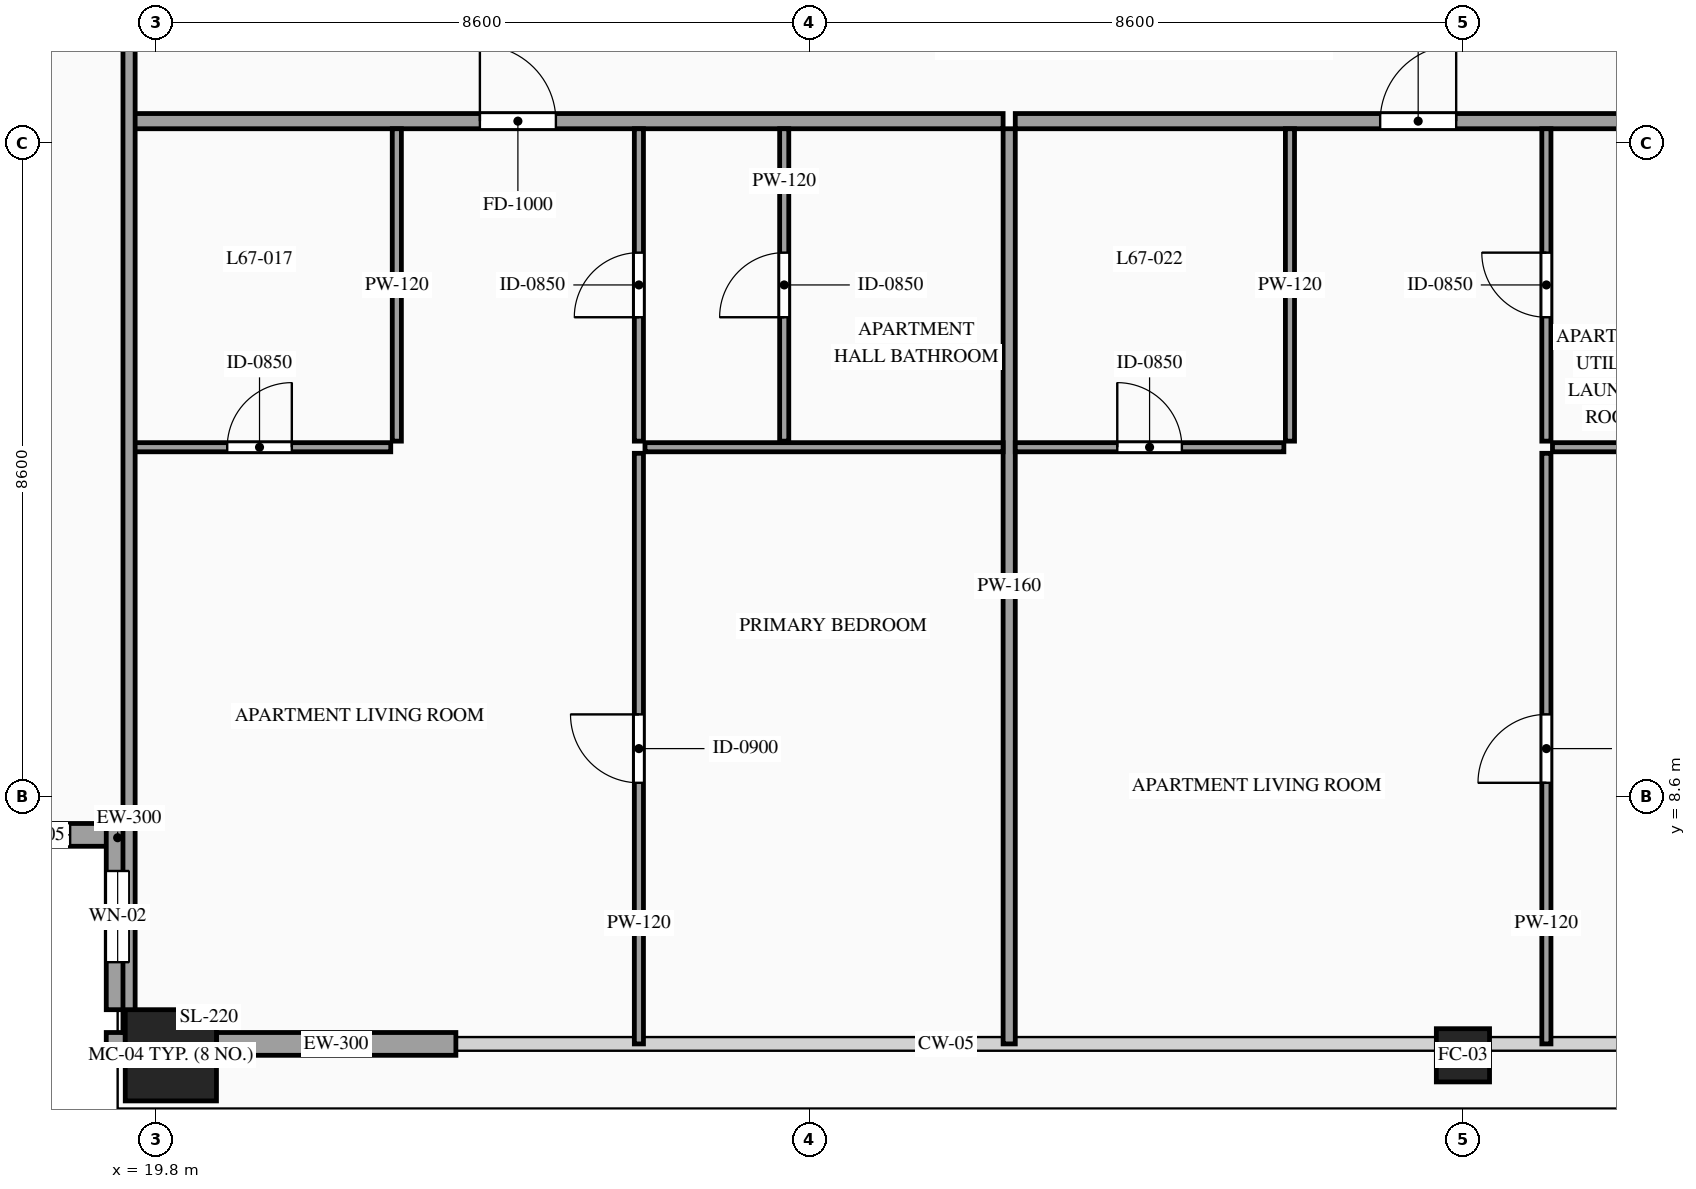
"""IFC4 building model, lengths in metres.
Left out: names, types, materials, properties, quantities, classifications, styles, units other than length and angle.
Written with IfcOpenShell. Run it as: python <this file> out.ifc"""

import sys

from ifc_helpers import new_model, si_unit, direction, frame, frame_2d, origin, origin_2d, place, context, subcontext, project, spatial, rectangle, hollow_rectangle, extrude, source, transform, mapped, element, fill, save


model = new_model("IFC4")
c1 = context("Model", 3, precision=1e-05, world=origin(), true_north=direction((0.0, 1.0)))
c2 = subcontext(c1, "Body", "Model", "MODEL_VIEW")
j1 = project(units=[si_unit("LENGTHUNIT", "METRE"), si_unit("PLANEANGLEUNIT", "RADIAN")], contexts=[c1])
p1 = place(None, origin())
s1 = spatial("IfcSite", under=j1, at=p1, CompositionType="ELEMENT")
p2 = place(p1, origin())
s2 = spatial("IfcBuilding", under=s1, at=p2, CompositionType="ELEMENT")
p3 = place(p2, frame((0.0, 0.0, 252.1)))
s3 = spatial("IfcBuildingStorey", under=s2, at=p3, CompositionType="ELEMENT", Elevation=252.1)
m1 = source(origin(), c2, "Body", "SweptSolid", [
    extrude(hollow_rectangle(XDim=1.2, YDim=1.2, WallThickness=0.055, at=origin_2d()), origin(), (0.0, 0.0, 1.0), 3.5),
])
p4 = place(p3, frame((20.0, 5.2, 0.0), z_axis=(0.0, 0.0, 1.0), x_axis=(1.0, 0.0, 0.0)))
e1 = element("IfcColumn", 1, at=p4, inside=s3, PredefinedType="COLUMN", context=c2, shape_type="MappedRepresentation", body=[
    mapped(m1, transform((0.0, 0.0, 0.0), scale=1.0)),
])
m2 = source(origin(), c2, "Body", "SweptSolid", [
    extrude(hollow_rectangle(XDim=0.7, YDim=0.7, WallThickness=0.032, at=origin_2d()), origin(), (0.0, 0.0, 1.0), 3.5),
])
p5 = place(p3, frame((37.0, 5.2, 0.0), z_axis=(0.0, 0.0, 1.0), x_axis=(1.0, 0.0, 0.0)))
e2 = element("IfcColumn", 2, at=p5, inside=s3, PredefinedType="COLUMN", context=c2, shape_type="MappedRepresentation", body=[
    mapped(m2, transform((0.0, 0.0, 0.0), scale=1.0)),
])
p6 = place(p3, frame((17.0, 8.1, 0.0), z_axis=(0.0, 0.0, 1.0), x_axis=(1.0, 0.0, 0.0)))
e3 = element("IfcWall", 3, at=p6, inside=s3, PredefinedType="SOLIDWALL", context=c2, shape_type="SweptSolid", body=[
    extrude(rectangle(XDim=2.45, YDim=0.3, at=frame_2d((1.225, 0.0))), origin(), (0.0, 0.0, 1.0), 3.28),
])
p7 = place(p6, frame((0.775, 0.0, 0.85)))
e4 = element("IfcOpeningElement", 4, at=p7, cuts=e3, PredefinedType="OPENING", context=c2, shape_type="SweptSolid", body=[
    extrude(rectangle(XDim=0.9, YDim=1.5, at=frame_2d((0.45, 0.75))), frame((0.0, 0.165, 0.0), z_axis=(0.0, -1.0, 0.0), x_axis=(1.0, 0.0, 0.0)), (0.0, 0.0, 1.0), 0.33),
])
p8 = place(p3, frame((19.3, 8.25, 0.0), z_axis=(0.0, 0.0, 1.0), x_axis=(0.0, -1.0, 0.0)))
e5 = element("IfcWall", 5, at=p8, inside=s3, PredefinedType="SOLIDWALL", context=c2, shape_type="SweptSolid", body=[
    extrude(rectangle(XDim=2.45, YDim=0.3, at=frame_2d((1.225, 0.0))), origin(), (0.0, 0.0, 1.0), 3.28),
])
p9 = place(p8, frame((0.625, 0.0, 0.85)))
e6 = element("IfcOpeningElement", 6, at=p9, cuts=e5, PredefinedType="OPENING", context=c2, shape_type="SweptSolid", body=[
    extrude(rectangle(XDim=1.2, YDim=2.1, at=frame_2d((0.6, 1.05))), frame((0.0, 0.165, 0.0), z_axis=(0.0, -1.0, 0.0), x_axis=(1.0, 0.0, 0.0)), (0.0, 0.0, 1.0), 0.33),
])
m3 = source(origin(), c2, "Body", "SweptSolid", [
    extrude(rectangle(XDim=0.25, YDim=0.3, at=frame_2d((0.125, 0.0))), origin(), (0.0, 0.0, 1.0), 3.28),
])
p10 = place(p3, frame((19.15, 5.35, 0.0), z_axis=(0.0, 0.0, 1.0), x_axis=(1.0, 0.0, 0.0)))
e7 = element("IfcWall", 7, at=p10, inside=s3, PredefinedType="SOLIDWALL", context=c2, shape_type="MappedRepresentation", body=[
    mapped(m3, transform((0.0, 0.0, 0.0), scale=1.0)),
])
m4 = source(origin(), c2, "Body", "SweptSolid", [
    extrude(rectangle(XDim=3.15, YDim=0.3, at=frame_2d((1.575, 0.0))), origin(), (0.0, 0.0, 1.0), 2.835),
])
p11 = place(p3, frame((20.6, 5.35, 0.0), z_axis=(0.0, 0.0, 1.0), x_axis=(1.0, 0.0, 0.0)))
e8 = element("IfcWall", 8, at=p11, inside=s3, PredefinedType="SOLIDWALL", context=c2, shape_type="MappedRepresentation", body=[
    mapped(m4, transform((0.0, 0.0, 0.0), scale=1.0)),
])
p12 = place(p3, frame((19.44, 17.49, 0.0), z_axis=(0.0, 0.0, 1.0), x_axis=(1.0, 0.0, 0.0)))
e9 = element("IfcWall", 9, at=p12, inside=s3, PredefinedType="PARTITIONING", context=c2, shape_type="SweptSolid", body=[
    extrude(rectangle(XDim=11.51, YDim=0.2, at=frame_2d((5.755, 0.0))), origin(), (0.0, 0.0, 1.0), 3.28),
])
p13 = place(p12, frame((4.626, 0.0, 0.0)))
e10 = element("IfcOpeningElement", 10, at=p13, cuts=e9, PredefinedType="OPENING", context=c2, shape_type="SweptSolid", body=[
    extrude(rectangle(XDim=1.0, YDim=2.2, at=frame_2d((0.5, 1.1))), frame((0.0, 0.115, 0.0), z_axis=(0.0, -1.0, 0.0), x_axis=(1.0, 0.0, 0.0)), (0.0, 0.0, 1.0), 0.23),
])
m5 = source(origin(), c2, "Body", "SweptSolid", [
    extrude(rectangle(XDim=12.04, YDim=0.16, at=frame_2d((6.02, 0.0))), origin(), (0.0, 0.0, 1.0), 3.28),
])
p14 = place(p3, frame((31.03, 5.35, 0.0), z_axis=(0.0, 0.0, 1.0), x_axis=(0.0, 1.0, 0.0)))
e11 = element("IfcWall", 11, at=p14, inside=s3, PredefinedType="PARTITIONING", context=c2, shape_type="MappedRepresentation", body=[
    mapped(m5, transform((0.0, 0.0, 0.0), scale=1.0)),
])
p15 = place(p3, frame((19.44, 13.2, 0.0), z_axis=(0.0, 0.0, 1.0), x_axis=(1.0, 0.0, 0.0)))
e12 = element("IfcWall", 12, at=p15, inside=s3, PredefinedType="PARTITIONING", context=c2, shape_type="SweptSolid", body=[
    extrude(rectangle(XDim=3.453, YDim=0.12, at=frame_2d((1.727, 0.0))), origin(), (0.0, 0.0, 1.0), 3.28),
])
p16 = place(p15, frame((1.302, 0.0, 0.0)))
e13 = element("IfcOpeningElement", 13, at=p16, cuts=e12, PredefinedType="OPENING", context=c2, shape_type="SweptSolid", body=[
    extrude(rectangle(XDim=0.85, YDim=2.1, at=frame_2d((0.425, 1.05))), frame((0.0, 0.075, 0.0), z_axis=(0.0, -1.0, 0.0), x_axis=(1.0, 0.0, 0.0)), (0.0, 0.0, 1.0), 0.15),
])
m6 = source(origin(), c2, "Body", "SweptSolid", [
    extrude(rectangle(XDim=4.11, YDim=0.12, at=frame_2d((2.055, 0.0))), origin(), (0.0, 0.0, 1.0), 3.28),
])
p17 = place(p3, frame((22.973, 13.28, 0.0), z_axis=(0.0, 0.0, 1.0), x_axis=(0.0, 1.0, 0.0)))
e14 = element("IfcWall", 14, at=p17, inside=s3, PredefinedType="PARTITIONING", context=c2, shape_type="MappedRepresentation", body=[
    mapped(m6, transform((0.0, 0.0, 0.0), scale=1.0)),
])
p18 = place(p3, frame((28.07, 13.28, 0.0), z_axis=(0.0, 0.0, 1.0), x_axis=(0.0, 1.0, 0.0)))
e15 = element("IfcWall", 15, at=p18, inside=s3, PredefinedType="PARTITIONING", context=c2, shape_type="SweptSolid", body=[
    extrude(rectangle(XDim=4.11, YDim=0.12, at=frame_2d((2.055, 0.0))), origin(), (0.0, 0.0, 1.0), 3.28),
])
p19 = place(p18, frame((1.63, 0.0, 0.0)))
e16 = element("IfcOpeningElement", 16, at=p19, cuts=e15, PredefinedType="OPENING", context=c2, shape_type="SweptSolid", body=[
    extrude(rectangle(XDim=0.85, YDim=2.1, at=frame_2d((0.425, 1.05))), frame((0.0, 0.075, 0.0), z_axis=(0.0, -1.0, 0.0), x_axis=(1.0, 0.0, 0.0)), (0.0, 0.0, 1.0), 0.15),
])
m7 = source(origin(), c2, "Body", "SweptSolid", [
    extrude(rectangle(XDim=4.712, YDim=0.12, at=frame_2d((2.356, 0.0))), origin(), (0.0, 0.0, 1.0), 3.28),
])
p20 = place(p3, frame((26.238, 13.2, 0.0), z_axis=(0.0, 0.0, 1.0), x_axis=(1.0, 0.0, 0.0)))
e17 = element("IfcWall", 17, at=p20, inside=s3, PredefinedType="PARTITIONING", context=c2, shape_type="MappedRepresentation", body=[
    mapped(m7, transform((0.0, 0.0, 0.0), scale=1.0)),
])
p21 = place(p3, frame((26.158, 5.35, 0.0), z_axis=(0.0, 0.0, 1.0), x_axis=(0.0, 1.0, 0.0)))
e18 = element("IfcWall", 18, at=p21, inside=s3, PredefinedType="PARTITIONING", context=c2, shape_type="SweptSolid", body=[
    extrude(rectangle(XDim=7.77, YDim=0.12, at=frame_2d((3.885, 0.0))), origin(), (0.0, 0.0, 1.0), 3.28),
])
p22 = place(p21, frame((3.435, 0.0, 0.0)))
e19 = element("IfcOpeningElement", 19, at=p22, cuts=e18, PredefinedType="OPENING", context=c2, shape_type="SweptSolid", body=[
    extrude(rectangle(XDim=0.9, YDim=2.15, at=frame_2d((0.45, 1.075))), frame((0.0, 0.075, 0.0), z_axis=(0.0, -1.0, 0.0), x_axis=(1.0, 0.0, 0.0)), (0.0, 0.0, 1.0), 0.15),
])
p23 = place(p3, frame((26.158, 13.28, 0.0), z_axis=(0.0, 0.0, 1.0), x_axis=(0.0, 1.0, 0.0)))
e20 = element("IfcWall", 20, at=p23, inside=s3, PredefinedType="PARTITIONING", context=c2, shape_type="SweptSolid", body=[
    extrude(rectangle(XDim=4.11, YDim=0.12, at=frame_2d((2.055, 0.0))), origin(), (0.0, 0.0, 1.0), 3.28),
])
p24 = place(p23, frame((1.63, 0.0, 0.0)))
e21 = element("IfcOpeningElement", 21, at=p24, cuts=e20, PredefinedType="OPENING", context=c2, shape_type="SweptSolid", body=[
    extrude(rectangle(XDim=0.85, YDim=2.1, at=frame_2d((0.425, 1.05))), frame((0.0, 0.075, 0.0), z_axis=(0.0, -1.0, 0.0), x_axis=(1.0, 0.0, 0.0)), (0.0, 0.0, 1.0), 0.15),
])
p25 = place(p3, frame((31.11, 17.49, 0.0), z_axis=(0.0, 0.0, 1.0), x_axis=(1.0, 0.0, 0.0)))
e22 = element("IfcWall", 22, at=p25, inside=s3, PredefinedType="PARTITIONING", context=c2, shape_type="SweptSolid", body=[
    extrude(rectangle(XDim=11.78, YDim=0.2, at=frame_2d((5.89, 0.0))), origin(), (0.0, 0.0, 1.0), 3.28),
])
p26 = place(p25, frame((4.801, 0.0, 0.0)))
e23 = element("IfcOpeningElement", 23, at=p26, cuts=e22, PredefinedType="OPENING", context=c2, shape_type="SweptSolid", body=[
    extrude(rectangle(XDim=1.0, YDim=2.2, at=frame_2d((0.5, 1.1))), frame((0.0, 0.115, 0.0), z_axis=(0.0, -1.0, 0.0), x_axis=(1.0, 0.0, 0.0)), (0.0, 0.0, 1.0), 0.23),
])
p27 = place(p3, frame((31.11, 13.2, 0.0), z_axis=(0.0, 0.0, 1.0), x_axis=(1.0, 0.0, 0.0)))
e24 = element("IfcWall", 24, at=p27, inside=s3, PredefinedType="PARTITIONING", context=c2, shape_type="SweptSolid", body=[
    extrude(rectangle(XDim=3.534, YDim=0.12, at=frame_2d((1.767, 0.0))), origin(), (0.0, 0.0, 1.0), 3.28),
])
p28 = place(p27, frame((1.342, 0.0, 0.0)))
e25 = element("IfcOpeningElement", 25, at=p28, cuts=e24, PredefinedType="OPENING", context=c2, shape_type="SweptSolid", body=[
    extrude(rectangle(XDim=0.85, YDim=2.1, at=frame_2d((0.425, 1.05))), frame((0.0, 0.075, 0.0), z_axis=(0.0, -1.0, 0.0), x_axis=(1.0, 0.0, 0.0)), (0.0, 0.0, 1.0), 0.15),
])
p29 = place(p3, frame((34.724, 13.28, 0.0), z_axis=(0.0, 0.0, 1.0), x_axis=(0.0, 1.0, 0.0)))
e26 = element("IfcWall", 26, at=p29, inside=s3, PredefinedType="PARTITIONING", context=c2, shape_type="MappedRepresentation", body=[
    mapped(m6, transform((0.0, 0.0, 0.0), scale=1.0)),
])
p30 = place(p3, frame((38.178, 13.2, 0.0), z_axis=(0.0, 0.0, 1.0), x_axis=(1.0, 0.0, 0.0)))
e27 = element("IfcWall", 27, at=p30, inside=s3, PredefinedType="PARTITIONING", context=c2, shape_type="MappedRepresentation", body=[
    mapped(m7, transform((0.0, 0.0, 0.0), scale=1.0)),
])
p31 = place(p3, frame((38.098, 5.35, 0.0), z_axis=(0.0, 0.0, 1.0), x_axis=(0.0, 1.0, 0.0)))
e28 = element("IfcWall", 28, at=p31, inside=s3, PredefinedType="PARTITIONING", context=c2, shape_type="SweptSolid", body=[
    extrude(rectangle(XDim=7.77, YDim=0.12, at=frame_2d((3.885, 0.0))), origin(), (0.0, 0.0, 1.0), 3.28),
])
p32 = place(p31, frame((3.435, 0.0, 0.0)))
e29 = element("IfcOpeningElement", 29, at=p32, cuts=e28, PredefinedType="OPENING", context=c2, shape_type="SweptSolid", body=[
    extrude(rectangle(XDim=0.9, YDim=2.15, at=frame_2d((0.45, 1.075))), frame((0.0, 0.075, 0.0), z_axis=(0.0, -1.0, 0.0), x_axis=(1.0, 0.0, 0.0)), (0.0, 0.0, 1.0), 0.15),
])
p33 = place(p3, frame((38.098, 13.28, 0.0), z_axis=(0.0, 0.0, 1.0), x_axis=(0.0, 1.0, 0.0)))
e30 = element("IfcWall", 30, at=p33, inside=s3, PredefinedType="PARTITIONING", context=c2, shape_type="SweptSolid", body=[
    extrude(rectangle(XDim=4.11, YDim=0.12, at=frame_2d((2.055, 0.0))), origin(), (0.0, 0.0, 1.0), 3.28),
])
p34 = place(p33, frame((1.63, 0.0, 0.0)))
e31 = element("IfcOpeningElement", 31, at=p34, cuts=e30, PredefinedType="OPENING", context=c2, shape_type="SweptSolid", body=[
    extrude(rectangle(XDim=0.85, YDim=2.1, at=frame_2d((0.425, 1.05))), frame((0.0, 0.075, 0.0), z_axis=(0.0, -1.0, 0.0), x_axis=(1.0, 0.0, 0.0)), (0.0, 0.0, 1.0), 0.15),
])
m8 = source(origin(), c2, "Body", "SweptSolid", [
    extrude(rectangle(XDim=26.69, YDim=0.16, at=frame_2d((13.345, 0.0))), origin(), (0.0, 0.0, 1.0), 3.28),
])
p35 = place(p3, frame((19.45, 5.5, 0.0), z_axis=(0.0, 0.0, 1.0), x_axis=(0.0, 1.0, 0.0)))
e32 = element("IfcWall", 32, at=p35, inside=s3, PredefinedType="PARTITIONING", context=c2, shape_type="MappedRepresentation", body=[
    mapped(m8, transform((0.0, 0.0, 0.0), scale=1.0)),
])
m9 = source(origin(), c2, "Body", "SweptSolid", [
    extrude(rectangle(XDim=0.9, YDim=1.5, at=frame_2d((0.45, 0.75))), frame((0.0, 0.03, 0.0), z_axis=(0.0, -1.0, 0.0), x_axis=(1.0, 0.0, 0.0)), (0.0, 0.0, 1.0), 0.06),
])
p36 = place(p7, origin())
e33 = element("IfcWindow", 33, at=p36, inside=s3, PartitioningType="SINGLE_PANEL", PredefinedType="WINDOW", context=c2, shape_type="MappedRepresentation", body=[
    mapped(m9, transform((0.0, 0.0, 0.0), scale=1.0)),
])
fill(e4, e33)
m10 = source(origin(), c2, "Body", "SweptSolid", [
    extrude(rectangle(XDim=1.2, YDim=2.1, at=frame_2d((0.6, 1.05))), frame((0.0, 0.03, 0.0), z_axis=(0.0, -1.0, 0.0), x_axis=(1.0, 0.0, 0.0)), (0.0, 0.0, 1.0), 0.06),
])
p37 = place(p9, origin())
e34 = element("IfcWindow", 34, at=p37, inside=s3, PartitioningType="SINGLE_PANEL", PredefinedType="WINDOW", context=c2, shape_type="MappedRepresentation", body=[
    mapped(m10, transform((0.0, 0.0, 0.0), scale=1.0)),
])
fill(e6, e34)
m11 = source(origin(), c2, "Body", "SweptSolid", [
    extrude(rectangle(XDim=1.0, YDim=2.2, at=frame_2d((0.5, 1.1))), frame((0.0, 0.025, 0.0), z_axis=(0.0, -1.0, 0.0), x_axis=(1.0, 0.0, 0.0)), (0.0, 0.0, 1.0), 0.05),
])
p38 = place(p13, origin())
e35 = element("IfcDoor", 35, at=p38, inside=s3, OperationType="SINGLE_SWING_LEFT", PredefinedType="DOOR", context=c2, shape_type="MappedRepresentation", body=[
    mapped(m11, transform((0.0, 0.0, 0.0), scale=1.0)),
])
fill(e10, e35)
m12 = source(origin(), c2, "Body", "SweptSolid", [
    extrude(rectangle(XDim=0.85, YDim=2.1, at=frame_2d((0.425, 1.05))), frame((0.0, 0.025, 0.0), z_axis=(0.0, -1.0, 0.0), x_axis=(1.0, 0.0, 0.0)), (0.0, 0.0, 1.0), 0.05),
])
p39 = place(p16, origin())
e36 = element("IfcDoor", 36, at=p39, inside=s3, OperationType="SINGLE_SWING_RIGHT", PredefinedType="DOOR", context=c2, shape_type="MappedRepresentation", body=[
    mapped(m12, transform((0.0, 0.0, 0.0), scale=1.0)),
])
fill(e13, e36)
p40 = place(p19, origin())
e37 = element("IfcDoor", 37, at=p40, inside=s3, OperationType="SINGLE_SWING_LEFT", PredefinedType="DOOR", context=c2, shape_type="MappedRepresentation", body=[
    mapped(m12, transform((0.0, 0.0, 0.0), scale=1.0)),
])
fill(e16, e37)
m13 = source(origin(), c2, "Body", "SweptSolid", [
    extrude(rectangle(XDim=0.9, YDim=2.15, at=frame_2d((0.45, 1.075))), frame((0.0, 0.025, 0.0), z_axis=(0.0, -1.0, 0.0), x_axis=(1.0, 0.0, 0.0)), (0.0, 0.0, 1.0), 0.05),
])
p41 = place(p22, origin())
e38 = element("IfcDoor", 38, at=p41, inside=s3, OperationType="SINGLE_SWING_RIGHT", PredefinedType="DOOR", context=c2, shape_type="MappedRepresentation", body=[
    mapped(m13, transform((0.0, 0.0, 0.0), scale=1.0)),
])
fill(e19, e38)
p42 = place(p24, origin())
e39 = element("IfcDoor", 39, at=p42, inside=s3, OperationType="SINGLE_SWING_LEFT", PredefinedType="DOOR", context=c2, shape_type="MappedRepresentation", body=[
    mapped(m12, transform((0.0, 0.0, 0.0), scale=1.0)),
])
fill(e21, e39)
p43 = place(p26, origin())
e40 = element("IfcDoor", 40, at=p43, inside=s3, OperationType="SINGLE_SWING_RIGHT", PredefinedType="DOOR", context=c2, shape_type="MappedRepresentation", body=[
    mapped(m11, transform((0.0, 0.0, 0.0), scale=1.0)),
])
fill(e23, e40)
p44 = place(p28, origin())
e41 = element("IfcDoor", 41, at=p44, inside=s3, OperationType="SINGLE_SWING_LEFT", PredefinedType="DOOR", context=c2, shape_type="MappedRepresentation", body=[
    mapped(m12, transform((0.0, 0.0, 0.0), scale=1.0)),
])
fill(e25, e41)
p45 = place(p32, origin())
e42 = element("IfcDoor", 42, at=p45, inside=s3, OperationType="SINGLE_SWING_LEFT", PredefinedType="DOOR", context=c2, shape_type="MappedRepresentation", body=[
    mapped(m13, transform((0.0, 0.0, 0.0), scale=1.0)),
])
fill(e29, e42)
p46 = place(p34, origin())
e43 = element("IfcDoor", 43, at=p46, inside=s3, OperationType="SINGLE_SWING_RIGHT", PredefinedType="DOOR", context=c2, shape_type="MappedRepresentation", body=[
    mapped(m12, transform((0.0, 0.0, 0.0), scale=1.0)),
])
fill(e31, e43)
save(model, sys.argv[1])
